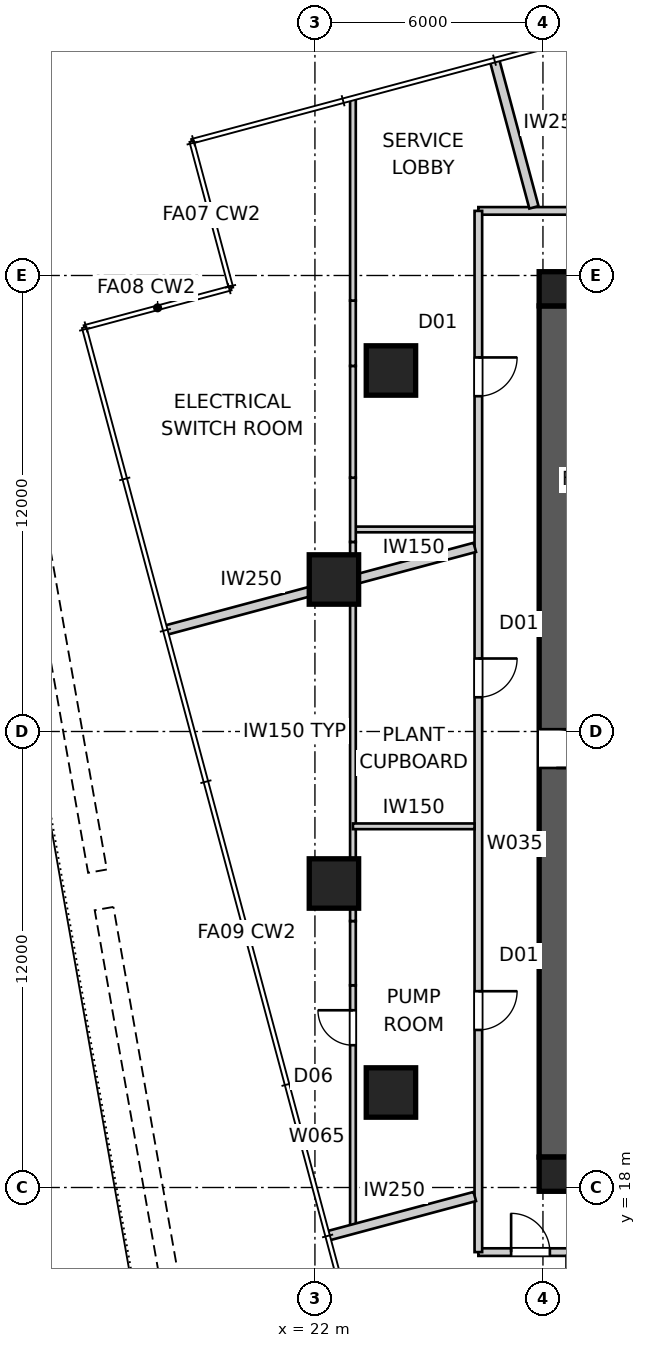
"""IFC4 building model, lengths in metres.
Left out: names, types, materials, properties, quantities, classifications, styles, units other than length and angle.
Written with IfcOpenShell. Run it as: python <this file> out.ifc"""

import sys

from ifc_helpers import new_model, si_unit, direction, frame, frame_2d, origin, origin_2d, place, context, subcontext, project, spatial, polyline, rectangle, outline, extrude, element, fill, save


model = new_model("IFC4")
c1 = context("Model", 3, precision=1e-05, world=origin(), true_north=direction((0.0, 1.0)))
c2 = subcontext(c1, "Body", "Model", "MODEL_VIEW")
j1 = project(units=[si_unit("LENGTHUNIT", "METRE"), si_unit("PLANEANGLEUNIT", "RADIAN")], contexts=[c1])
p1 = place(None, origin())
s1 = spatial("IfcSite", under=j1, at=p1, CompositionType="ELEMENT")
p2 = place(p1, origin())
s2 = spatial("IfcBuilding", under=s1, at=p2, CompositionType="ELEMENT")
p3 = place(p2, frame((0.0, 0.0, 106.6)))
s3 = spatial("IfcBuildingStorey", under=s2, at=p3, CompositionType="ELEMENT", Elevation=106.6)
for number, where, z_axis, x_axis in (
    (1, (28.8, 41.65, 0.0), (0.0, 0.0, 1.0), (1.0, 0.0, 0.0)),
    (2, (51.2, 18.35, 0.0), (0.0, 0.0, 1.0), (-1.0, 0.0, 0.0)),
):
    element("IfcWall", number, at=place(p3, frame(where, z_axis=z_axis, x_axis=x_axis)), inside=s3, PredefinedType="SHEAR", context=c2, shape_type="SweptSolid", body=[
        extrude(outline(polyline([(0.0, -0.45), (22.4, -0.45), (22.4, -0.025), (22.85, -0.025), (22.85, 0.025), (22.4, 0.025), (22.4, 0.45), (0.0, 0.45), (0.0, 0.025), (-0.45, 0.025), (-0.45, -0.025), (0.0, -0.025), (0.0, -0.45)])), origin(), (0.0, 0.0, 1.0), 5.0),
    ])
p4 = place(p3, frame((28.35, 41.2, 0.0), z_axis=(0.0, 0.0, 1.0), x_axis=(0.0, -1.0, 0.0)))
e3 = element("IfcWall", 3, at=p4, inside=s3, PredefinedType="SHEAR", context=c2, shape_type="SweptSolid", body=[
    extrude(outline(polyline([(0.0, -0.45), (22.4, -0.45), (22.4, -0.025), (22.85, -0.025), (22.85, 0.025), (22.4, 0.025), (22.4, 0.45), (0.0, 0.45), (0.0, 0.025), (-0.45, 0.025), (-0.45, -0.025), (0.0, -0.025), (0.0, -0.45)])), origin(), (0.0, 0.0, 1.0), 5.0),
])
p5 = place(p4, frame((11.14, 0.0, 0.0)))
e4 = element("IfcOpeningElement", 4, at=p5, cuts=e3, PredefinedType="OPENING", context=c2, shape_type="SweptSolid", body=[
    extrude(rectangle(XDim=1.02, YDim=2.4, at=frame_2d((0.51, 1.2))), frame((0.0, 0.46, 0.0), z_axis=(0.0, -1.0, 0.0), x_axis=(1.0, 0.0, 0.0)), (0.0, 0.0, 1.0), 0.92),
])
for number, where, z_axis, x_axis in (
    (5, (28.35, 18.35, 0.0), (0.0, 0.0, 1.0), (1.0, 0.0, 0.0)),
    (6, (28.35, 41.65, 0.0), (0.0, 0.0, 1.0), (1.0, 0.0, 0.0)),
):
    element("IfcColumn", number, at=place(p3, frame(where, z_axis=z_axis, x_axis=x_axis)), inside=s3, PredefinedType="COLUMN", context=c2, shape_type="SweptSolid", body=[
        extrude(rectangle(XDim=0.9, YDim=0.9, at=origin_2d()), origin(), (0.0, 0.0, 1.0), 5.0),
    ])
for number, where, z_axis, x_axis in (
    (7, (24.0, 39.5, 0.0), (0.0, 0.0, 1.0), (1.0, 0.0, 0.0)),
    (8, (22.5, 34.0, 0.0), (0.0, 0.0, 1.0), (1.0, 0.0, 0.0)),
    (9, (22.5, 26.0, 0.0), (0.0, 0.0, 1.0), (1.0, 0.0, 0.0)),
    (10, (24.0, 20.5, 0.0), (0.0, 0.0, 1.0), (1.0, 0.0, 0.0)),
):
    element("IfcColumn", number, at=place(p3, frame(where, z_axis=z_axis, x_axis=x_axis)), inside=s3, PredefinedType="COLUMN", context=c2, shape_type="SweptSolid", body=[
        extrude(rectangle(XDim=1.3, YDim=1.3, at=origin_2d()), origin(), (0.0, 0.0, 1.0), 5.0),
    ])
p6 = place(p3, frame((26.3, 16.3, 0.0), z_axis=(0.0, 0.0, 1.0), x_axis=(1.0, 0.0, 0.0)))
e11 = element("IfcWall", 11, at=p6, inside=s3, PredefinedType="PARTITIONING", context=c2, shape_type="SweptSolid", body=[
    extrude(rectangle(XDim=27.4, YDim=0.2, at=frame_2d((13.7, 0.0))), origin(), (0.0, 0.0, 1.0), 4.85),
])
p7 = place(p6, frame((21.972, 0.0, 0.0)))
e12 = element("IfcOpeningElement", 12, at=p7, cuts=e11, PredefinedType="OPENING", context=c2, shape_type="SweptSolid", body=[
    extrude(rectangle(XDim=1.02, YDim=2.34, at=frame_2d((0.51, 1.17))), frame((0.0, 0.11, 0.0), z_axis=(0.0, -1.0, 0.0), x_axis=(1.0, 0.0, 0.0)), (0.0, 0.0, 1.0), 0.22),
])
p8 = place(p6, frame((15.991, 0.0, 0.0)))
e13 = element("IfcOpeningElement", 13, at=p8, cuts=e11, PredefinedType="OPENING", context=c2, shape_type="SweptSolid", body=[
    extrude(rectangle(XDim=1.02, YDim=2.34, at=frame_2d((0.51, 1.17))), frame((0.0, 0.11, 0.0), z_axis=(0.0, -1.0, 0.0), x_axis=(1.0, 0.0, 0.0)), (0.0, 0.0, 1.0), 0.22),
])
p9 = place(p6, frame((10.853, 0.0, 0.0)))
e14 = element("IfcOpeningElement", 14, at=p9, cuts=e11, PredefinedType="OPENING", context=c2, shape_type="SweptSolid", body=[
    extrude(rectangle(XDim=1.02, YDim=2.34, at=frame_2d((0.51, 1.17))), frame((0.0, 0.11, 0.0), z_axis=(0.0, -1.0, 0.0), x_axis=(1.0, 0.0, 0.0)), (0.0, 0.0, 1.0), 0.22),
])
p10 = place(p6, frame((4.133, 0.0, 0.0)))
e15 = element("IfcOpeningElement", 15, at=p10, cuts=e11, PredefinedType="OPENING", context=c2, shape_type="SweptSolid", body=[
    extrude(rectangle(XDim=1.02, YDim=2.34, at=frame_2d((0.51, 1.17))), frame((0.0, 0.11, 0.0), z_axis=(0.0, -1.0, 0.0), x_axis=(1.0, 0.0, 0.0)), (0.0, 0.0, 1.0), 0.22),
])
p11 = place(p6, frame((0.862, 0.0, 0.0)))
e16 = element("IfcOpeningElement", 16, at=p11, cuts=e11, PredefinedType="OPENING", context=c2, shape_type="SweptSolid", body=[
    extrude(rectangle(XDim=1.02, YDim=2.34, at=frame_2d((0.51, 1.17))), frame((0.0, 0.11, 0.0), z_axis=(0.0, -1.0, 0.0), x_axis=(1.0, 0.0, 0.0)), (0.0, 0.0, 1.0), 0.22),
])
p12 = place(p6, frame((7.342, 0.0, 0.0)))
e17 = element("IfcOpeningElement", 17, at=p12, cuts=e11, PredefinedType="OPENING", context=c2, shape_type="SweptSolid", body=[
    extrude(rectangle(XDim=1.02, YDim=2.34, at=frame_2d((0.51, 1.17))), frame((0.0, 0.11, 0.0), z_axis=(0.0, -1.0, 0.0), x_axis=(1.0, 0.0, 0.0)), (0.0, 0.0, 1.0), 0.22),
])
p13 = place(p3, frame((53.7, 43.7, 0.0), z_axis=(0.0, 0.0, 1.0), x_axis=(-1.0, 0.0, 0.0)))
e18 = element("IfcWall", 18, at=p13, inside=s3, PredefinedType="PARTITIONING", context=c2, shape_type="SweptSolid", body=[
    extrude(rectangle(XDim=27.4, YDim=0.2, at=frame_2d((13.7, 0.0))), origin(), (0.0, 0.0, 1.0), 4.85),
])
p14 = place(p13, frame((16.834, 0.0, 0.0)))
e19 = element("IfcOpeningElement", 19, at=p14, cuts=e18, PredefinedType="OPENING", context=c2, shape_type="SweptSolid", body=[
    extrude(rectangle(XDim=1.02, YDim=2.34, at=frame_2d((0.51, 1.17))), frame((0.0, 0.11, 0.0), z_axis=(0.0, -1.0, 0.0), x_axis=(1.0, 0.0, 0.0)), (0.0, 0.0, 1.0), 0.22),
])
p15 = place(p13, frame((4.071, 0.0, 0.0)))
e20 = element("IfcOpeningElement", 20, at=p15, cuts=e18, PredefinedType="OPENING", context=c2, shape_type="SweptSolid", body=[
    extrude(rectangle(XDim=1.02, YDim=2.34, at=frame_2d((0.51, 1.17))), frame((0.0, 0.11, 0.0), z_axis=(0.0, -1.0, 0.0), x_axis=(1.0, 0.0, 0.0)), (0.0, 0.0, 1.0), 0.22),
])
p16 = place(p3, frame((26.3, 43.7, 0.0), z_axis=(0.0, 0.0, 1.0), x_axis=(0.0, -1.0, 0.0)))
e21 = element("IfcWall", 21, at=p16, inside=s3, PredefinedType="PARTITIONING", context=c2, shape_type="SweptSolid", body=[
    extrude(rectangle(XDim=27.4, YDim=0.2, at=frame_2d((13.7, 0.0))), origin(), (0.0, 0.0, 1.0), 4.85),
])
p17 = place(p16, frame((20.535, 0.0, 0.0)))
e22 = element("IfcOpeningElement", 22, at=p17, cuts=e21, PredefinedType="OPENING", context=c2, shape_type="SweptSolid", body=[
    extrude(rectangle(XDim=1.02, YDim=2.34, at=frame_2d((0.51, 1.17))), frame((0.0, 0.11, 0.0), z_axis=(0.0, -1.0, 0.0), x_axis=(1.0, 0.0, 0.0)), (0.0, 0.0, 1.0), 0.22),
])
p18 = place(p16, frame((3.856, 0.0, 0.0)))
e23 = element("IfcOpeningElement", 23, at=p18, cuts=e21, PredefinedType="OPENING", context=c2, shape_type="SweptSolid", body=[
    extrude(rectangle(XDim=1.02, YDim=2.34, at=frame_2d((0.51, 1.17))), frame((0.0, 0.11, 0.0), z_axis=(0.0, -1.0, 0.0), x_axis=(1.0, 0.0, 0.0)), (0.0, 0.0, 1.0), 0.22),
])
p19 = place(p16, frame((11.779, 0.0, 0.0)))
e24 = element("IfcOpeningElement", 24, at=p19, cuts=e21, PredefinedType="OPENING", context=c2, shape_type="SweptSolid", body=[
    extrude(rectangle(XDim=1.02, YDim=2.34, at=frame_2d((0.51, 1.17))), frame((0.0, 0.11, 0.0), z_axis=(0.0, -1.0, 0.0), x_axis=(1.0, 0.0, 0.0)), (0.0, 0.0, 1.0), 0.22),
])
p20 = place(p3, frame((26.725, 47.666, 0.0), z_axis=(0.0, 0.0, 1.0), x_axis=(0.258807108475, -0.96592902462, 0.0)))
e25 = element("IfcWall", 25, at=p20, inside=s3, PredefinedType="PARTITIONING", context=c2, shape_type="SweptSolid", body=[
    extrude(rectangle(XDim=4.009, YDim=0.25, at=frame_2d((2.004, 0.0))), origin(), (0.0, 0.0, 1.0), 4.85),
])
p21 = place(p3, frame((18.063, 32.663, 0.0), z_axis=(0.0, 0.0, 1.0), x_axis=(0.965927110389, 0.25881425273, 0.0)))
e26 = element("IfcWall", 26, at=p21, inside=s3, PredefinedType="PARTITIONING", context=c2, shape_type="SweptSolid", body=[
    extrude(rectangle(XDim=8.43, YDim=0.25, at=frame_2d((4.215, 0.0))), origin(), (0.0, 0.0, 1.0), 4.85),
])
p22 = place(p3, frame((22.334, 16.725, 0.0), z_axis=(0.0, 0.0, 1.0), x_axis=(0.96592902462, 0.258807108475, 0.0)))
e27 = element("IfcWall", 27, at=p22, inside=s3, PredefinedType="PARTITIONING", context=c2, shape_type="SweptSolid", body=[
    extrude(rectangle(XDim=4.009, YDim=0.25, at=frame_2d((2.004, 0.0))), origin(), (0.0, 0.0, 1.0), 4.85),
])
p23 = place(p3, frame((26.2, 35.317, 0.0), z_axis=(0.0, 0.0, 1.0), x_axis=(-1.0, 0.0, 0.0)))
e28 = element("IfcWall", 28, at=p23, inside=s3, PredefinedType="SOLIDWALL", context=c2, shape_type="SweptSolid", body=[
    extrude(rectangle(XDim=3.2, YDim=0.15, at=frame_2d((1.6, 0.0))), origin(), (0.0, 0.0, 1.0), 4.85),
])
p24 = place(p3, frame((23.0, 16.904, 0.0), z_axis=(0.0, 0.0, 1.0), x_axis=(0.0, 1.0, 0.0)))
e29 = element("IfcWall", 29, at=p24, inside=s3, PredefinedType="SOLIDWALL", context=c2, shape_type="SweptSolid", body=[
    extrude(rectangle(XDim=6.418, YDim=0.15, at=frame_2d((3.209, 0.0))), origin(), (0.0, 0.0, 1.0), 4.85),
])
p25 = place(p24, frame((4.841, 0.0, 0.0)))
e30 = element("IfcOpeningElement", 30, at=p25, cuts=e29, PredefinedType="OPENING", context=c2, shape_type="SweptSolid", body=[
    extrude(rectangle(XDim=0.92, YDim=2.1, at=frame_2d((0.46, 1.05))), frame((0.0, 0.085, 0.0), z_axis=(0.0, -1.0, 0.0), x_axis=(1.0, 0.0, 0.0)), (0.0, 0.0, 1.0), 0.17),
])
p26 = place(p3, frame((23.0, 23.322, 0.0), z_axis=(0.0, 0.0, 1.0), x_axis=(0.0, 1.0, 0.0)))
e31 = element("IfcWall", 31, at=p26, inside=s3, PredefinedType="SOLIDWALL", context=c2, shape_type="SweptSolid", body=[
    extrude(rectangle(XDim=1.69, YDim=0.15, at=frame_2d((0.845, 0.0))), origin(), (0.0, 0.0, 1.0), 3.85),
])
p27 = place(p3, frame((23.0, 25.012, 0.0), z_axis=(0.0, 0.0, 1.0), x_axis=(0.0, 1.0, 0.0)))
e32 = element("IfcWall", 32, at=p27, inside=s3, PredefinedType="SOLIDWALL", context=c2, shape_type="SweptSolid", body=[
    extrude(rectangle(XDim=9.977, YDim=0.15, at=frame_2d((4.988, 0.0))), origin(), (0.0, 0.0, 1.0), 4.85),
])
p28 = place(p3, frame((23.0, 34.988, 0.0), z_axis=(0.0, 0.0, 1.0), x_axis=(0.0, 1.0, 0.0)))
e33 = element("IfcWall", 33, at=p28, inside=s3, PredefinedType="SOLIDWALL", context=c2, shape_type="SweptSolid", body=[
    extrude(rectangle(XDim=1.69, YDim=0.15, at=frame_2d((0.845, 0.0))), origin(), (0.0, 0.0, 1.0), 3.85),
])
p29 = place(p3, frame((23.0, 36.678, 0.0), z_axis=(0.0, 0.0, 1.0), x_axis=(0.0, 1.0, 0.0)))
e34 = element("IfcWall", 34, at=p29, inside=s3, PredefinedType="SOLIDWALL", context=c2, shape_type="SweptSolid", body=[
    extrude(rectangle(XDim=2.942, YDim=0.15, at=frame_2d((1.471, 0.0))), origin(), (0.0, 0.0, 1.0), 4.85),
])
p30 = place(p3, frame((23.0, 39.62, 0.0), z_axis=(0.0, 0.0, 1.0), x_axis=(0.0, 1.0, 0.0)))
e35 = element("IfcWall", 35, at=p30, inside=s3, PredefinedType="SOLIDWALL", context=c2, shape_type="SweptSolid", body=[
    extrude(rectangle(XDim=1.719, YDim=0.15, at=frame_2d((0.859, 0.0))), origin(), (0.0, 0.0, 1.0), 4.049),
])
p31 = place(p3, frame((23.0, 41.339, 0.0), z_axis=(0.0, 0.0, 1.0), x_axis=(0.0, 1.0, 0.0)))
e36 = element("IfcWall", 36, at=p31, inside=s3, PredefinedType="SOLIDWALL", context=c2, shape_type="SweptSolid", body=[
    extrude(rectangle(XDim=5.287, YDim=0.15, at=frame_2d((2.644, 0.0))), origin(), (0.0, 0.0, 1.0), 4.85),
])
p32 = place(p3, frame((23.0, 27.505, 0.0), z_axis=(0.0, 0.0, 1.0), x_axis=(1.0, 0.0, 0.0)))
e37 = element("IfcWall", 37, at=p32, inside=s3, PredefinedType="SOLIDWALL", context=c2, shape_type="SweptSolid", body=[
    extrude(rectangle(XDim=3.2, YDim=0.15, at=frame_2d((1.6, 0.0))), origin(), (0.0, 0.0, 1.0), 4.85),
])
p33 = place(p17, origin())
e38 = element("IfcDoor", 38, at=p33, inside=s3, OperationType="SINGLE_SWING_LEFT", PredefinedType="DOOR", context=c2, shape_type="SweptSolid", body=[
    extrude(rectangle(XDim=1.02, YDim=2.34, at=frame_2d((0.51, 1.17))), frame((0.0, 0.025, 0.0), z_axis=(0.0, -1.0, 0.0), x_axis=(1.0, 0.0, 0.0)), (0.0, 0.0, 1.0), 0.05),
])
fill(e22, e38)
p34 = place(p18, origin())
e39 = element("IfcDoor", 39, at=p34, inside=s3, OperationType="SINGLE_SWING_LEFT", PredefinedType="DOOR", context=c2, shape_type="SweptSolid", body=[
    extrude(rectangle(XDim=1.02, YDim=2.34, at=frame_2d((0.51, 1.17))), frame((0.0, 0.025, 0.0), z_axis=(0.0, -1.0, 0.0), x_axis=(1.0, 0.0, 0.0)), (0.0, 0.0, 1.0), 0.05),
])
fill(e23, e39)
p35 = place(p19, origin())
e40 = element("IfcDoor", 40, at=p35, inside=s3, OperationType="SINGLE_SWING_LEFT", PredefinedType="DOOR", context=c2, shape_type="SweptSolid", body=[
    extrude(rectangle(XDim=1.02, YDim=2.34, at=frame_2d((0.51, 1.17))), frame((0.0, 0.025, 0.0), z_axis=(0.0, -1.0, 0.0), x_axis=(1.0, 0.0, 0.0)), (0.0, 0.0, 1.0), 0.05),
])
fill(e24, e40)
p36 = place(p11, origin())
e41 = element("IfcDoor", 41, at=p36, inside=s3, OperationType="SINGLE_SWING_LEFT", PredefinedType="DOOR", context=c2, shape_type="SweptSolid", body=[
    extrude(rectangle(XDim=1.02, YDim=2.34, at=frame_2d((0.51, 1.17))), frame((0.0, 0.025, 0.0), z_axis=(0.0, -1.0, 0.0), x_axis=(1.0, 0.0, 0.0)), (0.0, 0.0, 1.0), 0.05),
])
fill(e16, e41)
p37 = place(p25, origin())
e42 = element("IfcDoor", 42, at=p37, inside=s3, OperationType="SINGLE_SWING_RIGHT", PredefinedType="DOOR", context=c2, shape_type="SweptSolid", body=[
    extrude(rectangle(XDim=0.92, YDim=2.1, at=frame_2d((0.46, 1.05))), frame((0.0, 0.025, 0.0), z_axis=(0.0, -1.0, 0.0), x_axis=(1.0, 0.0, 0.0)), (0.0, 0.0, 1.0), 0.05),
])
fill(e30, e42)
p38 = place(p5, origin())
e43 = element("IfcDoor", 43, at=p38, inside=s3, OperationType="SINGLE_SWING_RIGHT", PredefinedType="DOOR", context=c2, shape_type="SweptSolid", body=[
    extrude(rectangle(XDim=1.02, YDim=2.4, at=frame_2d((0.51, 1.2))), frame((0.0, 0.025, 0.0), z_axis=(0.0, -1.0, 0.0), x_axis=(1.0, 0.0, 0.0)), (0.0, 0.0, 1.0), 0.05),
])
fill(e4, e43)
save(model, sys.argv[1])
